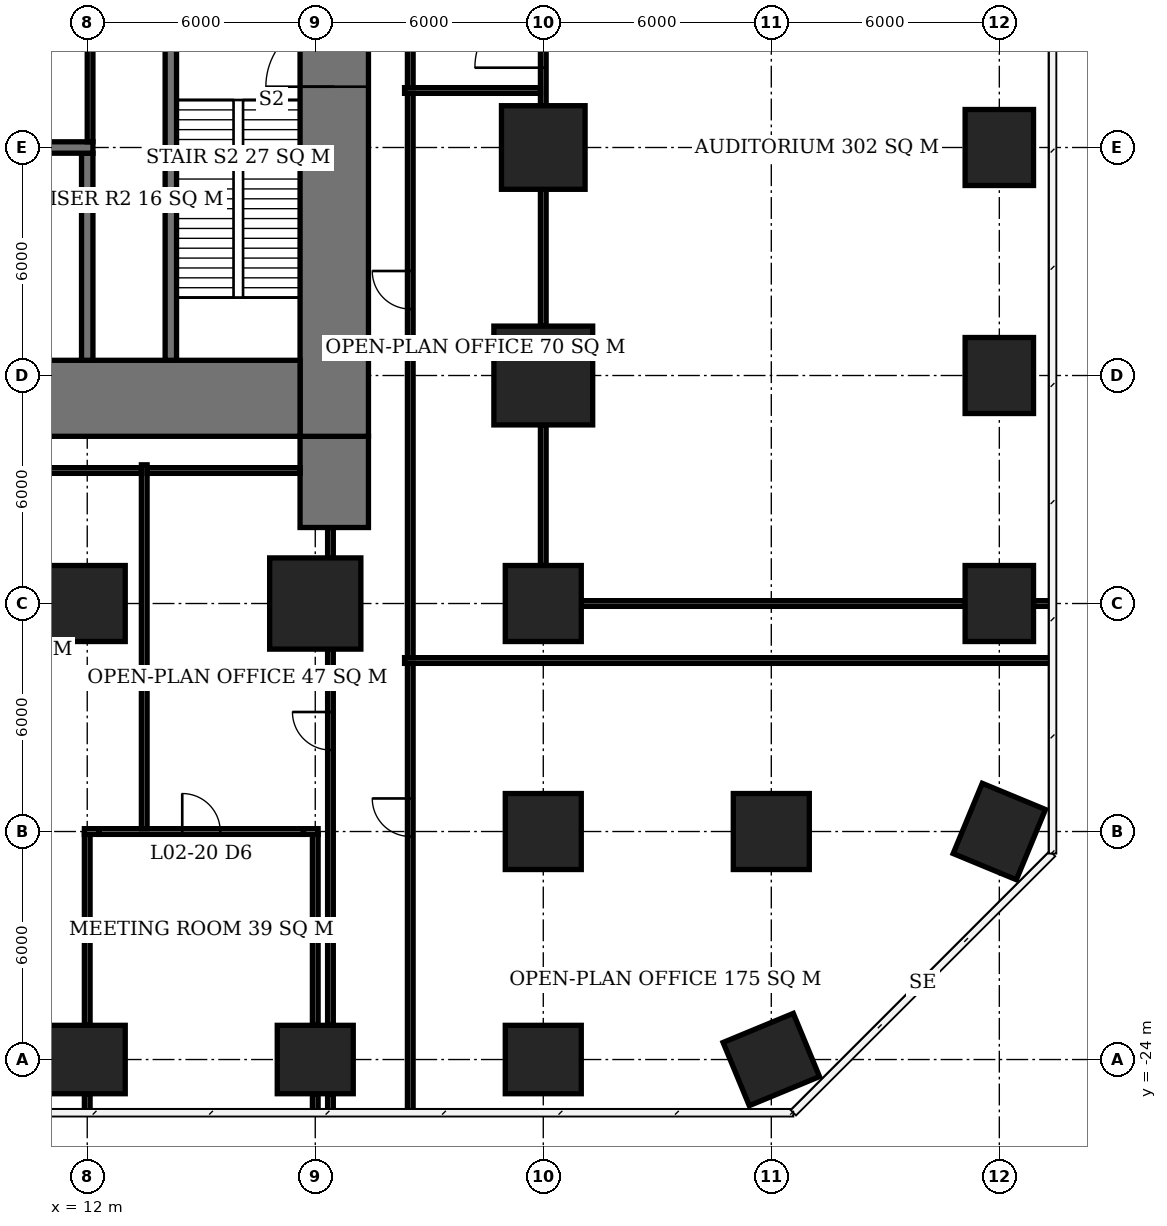
"""IFC4 building model, lengths in metres.
Left out: names, types, materials, properties, quantities, classifications, styles, units other than length and angle.
Written with IfcOpenShell. Run it as: python <this file> out.ifc"""

import sys

from ifc_helpers import new_model, si_unit, direction, frame, frame_2d, origin, origin_2d, place, context, subcontext, project, spatial, rectangle, extrude, element, fill, save


model = new_model("IFC4")
c1 = context("Model", 3, precision=1e-05, world=origin(), true_north=direction((0.0, 1.0)))
c2 = subcontext(c1, "Body", "Model", "MODEL_VIEW")
j1 = project(units=[si_unit("LENGTHUNIT", "METRE"), si_unit("PLANEANGLEUNIT", "RADIAN")], contexts=[c1])
p1 = place(None, origin())
s1 = spatial("IfcSite", under=j1, at=p1, CompositionType="ELEMENT")
p2 = place(p1, origin())
s2 = spatial("IfcBuilding", under=s1, at=p2, CompositionType="ELEMENT")
p3 = place(p2, frame((0.0, 0.0, 11.0)))
s3 = spatial("IfcBuildingStorey", under=s2, at=p3, CompositionType="ELEMENT", Elevation=11.0)
p4 = place(p3, frame((12.0, -24.0, 0.0), z_axis=(0.0, 0.0, 1.0), x_axis=(1.0, 0.0, 0.0)))
e1 = element("IfcColumn", 1, at=p4, inside=s3, PredefinedType="COLUMN", context=c2, shape_type="SweptSolid", body=[
    extrude(rectangle(XDim=2.0, YDim=1.8, at=origin_2d()), origin(), (0.0, 0.0, 1.0), 7.2),
])
p5 = place(p3, frame((12.0, -12.0, 0.0), z_axis=(0.0, 0.0, 1.0), x_axis=(1.0, 0.0, 0.0)))
e2 = element("IfcColumn", 2, at=p5, inside=s3, PredefinedType="COLUMN", context=c2, shape_type="SweptSolid", body=[
    extrude(rectangle(XDim=2.0, YDim=2.0, at=origin_2d()), origin(), (0.0, 0.0, 1.0), 7.2),
])
p6 = place(p3, frame((18.0, -24.0, 0.0), z_axis=(0.0, 0.0, 1.0), x_axis=(1.0, 0.0, 0.0)))
e3 = element("IfcColumn", 3, at=p6, inside=s3, PredefinedType="COLUMN", context=c2, shape_type="SweptSolid", body=[
    extrude(rectangle(XDim=2.0, YDim=1.8, at=origin_2d()), origin(), (0.0, 0.0, 1.0), 7.2),
])
p7 = place(p3, frame((18.0, -12.0, 0.0), z_axis=(0.0, 0.0, 1.0), x_axis=(1.0, 0.0, 0.0)))
e4 = element("IfcColumn", 4, at=p7, inside=s3, PredefinedType="COLUMN", context=c2, shape_type="SweptSolid", body=[
    extrude(rectangle(XDim=2.4, YDim=2.4, at=origin_2d()), origin(), (0.0, 0.0, 1.0), 7.2),
])
p8 = place(p3, frame((24.0, -24.0, 0.0), z_axis=(0.0, 0.0, 1.0), x_axis=(1.0, 0.0, 0.0)))
e5 = element("IfcColumn", 5, at=p8, inside=s3, PredefinedType="COLUMN", context=c2, shape_type="SweptSolid", body=[
    extrude(rectangle(XDim=2.0, YDim=1.8, at=origin_2d()), origin(), (0.0, 0.0, 1.0), 7.2),
])
for number, where, z_axis, x_axis in (
    (6, (24.0, -18.0, 0.0), (0.0, 0.0, 1.0), (1.0, 0.0, 0.0)),
    (7, (24.0, -12.0, 0.0), (0.0, 0.0, 1.0), (1.0, 0.0, 0.0)),
):
    element("IfcColumn", number, at=place(p3, frame(where, z_axis=z_axis, x_axis=x_axis)), inside=s3, PredefinedType="COLUMN", context=c2, shape_type="SweptSolid", body=[
        extrude(rectangle(XDim=2.0, YDim=2.0, at=origin_2d()), origin(), (0.0, 0.0, 1.0), 7.2),
    ])
p9 = place(p3, frame((24.0, -6.0, 0.0), z_axis=(0.0, 0.0, 1.0), x_axis=(1.0, 0.0, 0.0)))
e8 = element("IfcColumn", 8, at=p9, inside=s3, PredefinedType="COLUMN", context=c2, shape_type="SweptSolid", body=[
    extrude(rectangle(XDim=2.6, YDim=2.6, at=origin_2d()), origin(), (0.0, 0.0, 1.0), 7.2),
])
p10 = place(p3, frame((24.0, 0.0, 0.0), z_axis=(0.0, 0.0, 1.0), x_axis=(1.0, 0.0, 0.0)))
e9 = element("IfcColumn", 9, at=p10, inside=s3, PredefinedType="COLUMN", context=c2, shape_type="SweptSolid", body=[
    extrude(rectangle(XDim=2.2, YDim=2.2, at=origin_2d()), origin(), (0.0, 0.0, 1.0), 7.2),
])
p11 = place(p3, frame((30.0, -24.0, 0.0), z_axis=(0.0, 0.0, 1.0), x_axis=(-0.923879532511, -0.382683432365, 0.0)))
e10 = element("IfcColumn", 10, at=p11, inside=s3, PredefinedType="COLUMN", context=c2, shape_type="SweptSolid", body=[
    extrude(rectangle(XDim=2.0, YDim=1.8, at=origin_2d()), origin(), (0.0, 0.0, 1.0), 7.2),
])
p12 = place(p3, frame((30.0, -18.0, 0.0), z_axis=(0.0, 0.0, 1.0), x_axis=(1.0, 0.0, 0.0)))
e11 = element("IfcColumn", 11, at=p12, inside=s3, PredefinedType="COLUMN", context=c2, shape_type="SweptSolid", body=[
    extrude(rectangle(XDim=2.0, YDim=2.0, at=origin_2d()), origin(), (0.0, 0.0, 1.0), 7.2),
])
for number, where, z_axis, x_axis in (
    (12, (36.0, -18.0, 0.0), (0.0, 0.0, 1.0), (-0.383, -0.924, 0.0)),
    (13, (36.0, -12.0, 0.0), (0.0, 0.0, 1.0), (0.0, 1.0, 0.0)),
    (14, (36.0, -6.0, 0.0), (0.0, 0.0, 1.0), (0.0, 1.0, 0.0)),
    (15, (36.0, 0.0, 0.0), (0.0, 0.0, 1.0), (0.0, 1.0, 0.0)),
):
    element("IfcColumn", number, at=place(p3, frame(where, z_axis=z_axis, x_axis=x_axis)), inside=s3, PredefinedType="COLUMN", context=c2, shape_type="SweptSolid", body=[
        extrude(rectangle(XDim=2.0, YDim=1.8, at=origin_2d()), origin(), (0.0, 0.0, 1.0), 7.2),
    ])
p13 = place(p3, frame((-5.6, -6.6, 0.0), z_axis=(0.0, 0.0, 1.0), x_axis=(1.0, 0.0, 0.0)))
e16 = element("IfcWall", 16, at=p13, inside=s3, PredefinedType="SHEAR", context=c2, shape_type="SweptSolid", body=[
    extrude(rectangle(XDim=23.2, YDim=2.0, at=frame_2d((11.6, 0.0))), origin(), (0.0, 0.0, 1.0), 7.2),
])
p14 = place(p3, frame((18.5, -7.6, 0.0), z_axis=(0.0, 0.0, 1.0), x_axis=(0.0, 1.0, 0.0)))
e17 = element("IfcWall", 17, at=p14, inside=s3, PredefinedType="SHEAR", context=c2, shape_type="SweptSolid", body=[
    extrude(rectangle(XDim=21.2, YDim=1.8, at=frame_2d((10.6, 0.0))), origin(), (0.0, 0.0, 1.0), 7.2),
])
p15 = place(p14, frame((9.2, 0.0, 0.0)))
e18 = element("IfcOpeningElement", 18, at=p15, cuts=e17, PredefinedType="OPENING", context=c2, shape_type="SweptSolid", body=[
    extrude(rectangle(XDim=1.8, YDim=2.4, at=frame_2d((0.9, 1.2))), frame((0.0, 0.91, 0.0), z_axis=(0.0, -1.0, 0.0), x_axis=(1.0, 0.0, 0.0)), (0.0, 0.0, 1.0), 1.82),
])
p16 = place(p3, frame((18.5, -10.0, 0.0), z_axis=(0.0, 0.0, 1.0), x_axis=(0.0, 1.0, 0.0)))
e19 = element("IfcWall", 19, at=p16, inside=s3, PredefinedType="SHEAR", context=c2, shape_type="SweptSolid", body=[
    extrude(rectangle(XDim=2.4, YDim=1.8, at=frame_2d((1.2, 0.0))), origin(), (0.0, 0.0, 1.0), 7.2),
])
p17 = place(p3, frame((-5.6, 0.0, 0.0), z_axis=(0.0, 0.0, 1.0), x_axis=(1.0, 0.0, 0.0)))
e20 = element("IfcWall", 20, at=p17, inside=s3, PredefinedType="SHEAR", context=c2, shape_type="SweptSolid", body=[
    extrude(rectangle(XDim=17.75, YDim=0.3, at=frame_2d((8.875, 0.0))), origin(), (0.0, 0.0, 1.0), 7.2),
])
p18 = place(p17, frame((0.6, 0.0, 0.0)))
e21 = element("IfcOpeningElement", 21, at=p18, cuts=e20, PredefinedType="OPENING", context=c2, shape_type="SweptSolid", body=[
    extrude(rectangle(XDim=0.9, YDim=2.1, at=frame_2d((0.45, 1.05))), frame((0.0, 0.16, 0.0), z_axis=(0.0, -1.0, 0.0), x_axis=(1.0, 0.0, 0.0)), (0.0, 0.0, 1.0), 0.32),
])
p19 = place(p17, frame((3.7, 0.0, 0.0)))
e22 = element("IfcOpeningElement", 22, at=p19, cuts=e20, PredefinedType="OPENING", context=c2, shape_type="SweptSolid", body=[
    extrude(rectangle(XDim=1.0, YDim=2.1, at=frame_2d((0.5, 1.05))), frame((0.0, 0.16, 0.0), z_axis=(0.0, -1.0, 0.0), x_axis=(1.0, 0.0, 0.0)), (0.0, 0.0, 1.0), 0.32),
])
p20 = place(p3, frame((12.0, -5.6, 0.0), z_axis=(0.0, 0.0, 1.0), x_axis=(0.0, 1.0, 0.0)))
e23 = element("IfcWall", 23, at=p20, inside=s3, PredefinedType="SHEAR", context=c2, shape_type="SweptSolid", body=[
    extrude(rectangle(XDim=5.45, YDim=0.3, at=frame_2d((2.725, 0.0))), origin(), (0.0, 0.0, 1.0), 7.2),
])
p21 = place(p3, frame((14.2, -5.6, 0.0), z_axis=(0.0, 0.0, 1.0), x_axis=(0.0, 1.0, 0.0)))
e24 = element("IfcWall", 24, at=p21, inside=s3, PredefinedType="SHEAR", context=c2, shape_type="SweptSolid", body=[
    extrude(rectangle(XDim=8.45, YDim=0.3, at=frame_2d((4.225, 0.0))), origin(), (0.0, 0.0, 1.0), 7.2),
])
p22 = place(p3, frame((11.925, -18.0, 0.0), z_axis=(0.0, 0.0, 1.0), x_axis=(1.0, 0.0, 0.0)))
e25 = element("IfcWall", 25, at=p22, inside=s3, PredefinedType="PARTITIONING", context=c2, shape_type="SweptSolid", body=[
    extrude(rectangle(XDim=0.385, YDim=0.15, at=frame_2d((0.192, 0.0))), origin(), (0.0, 0.0, 1.0), 6.35),
])
p23 = place(p3, frame((12.31, -18.0, 0.0), z_axis=(0.0, 0.0, 1.0), x_axis=(1.0, 0.0, 0.0)))
e26 = element("IfcWall", 26, at=p23, inside=s3, PredefinedType="PARTITIONING", context=c2, shape_type="SweptSolid", body=[
    extrude(rectangle(XDim=5.38, YDim=0.15, at=frame_2d((2.69, 0.0))), origin(), (0.0, 0.0, 1.0), 6.95),
])
p24 = place(p23, frame((2.19, 0.0, 0.0)))
e27 = element("IfcOpeningElement", 27, at=p24, cuts=e26, PredefinedType="OPENING", context=c2, shape_type="SweptSolid", body=[
    extrude(rectangle(XDim=1.0, YDim=2.1, at=frame_2d((0.5, 1.05))), frame((0.0, 0.085, 0.0), z_axis=(0.0, -1.0, 0.0), x_axis=(1.0, 0.0, 0.0)), (0.0, 0.0, 1.0), 0.17),
])
p25 = place(p3, frame((17.69, -18.0, 0.0), z_axis=(0.0, 0.0, 1.0), x_axis=(1.0, 0.0, 0.0)))
e28 = element("IfcWall", 28, at=p25, inside=s3, PredefinedType="PARTITIONING", context=c2, shape_type="SweptSolid", body=[
    extrude(rectangle(XDim=0.385, YDim=0.15, at=frame_2d((0.192, 0.0))), origin(), (0.0, 0.0, 1.0), 6.35),
])
p26 = place(p3, frame((25.0, -12.0, 0.0), z_axis=(0.0, 0.0, 1.0), x_axis=(1.0, 0.0, 0.0)))
e29 = element("IfcWall", 29, at=p26, inside=s3, PredefinedType="PARTITIONING", context=c2, shape_type="SweptSolid", body=[
    extrude(rectangle(XDim=10.1, YDim=0.15, at=frame_2d((5.05, 0.0))), origin(), (0.0, 0.0, 1.0), 6.8),
])
p27 = place(p3, frame((36.9, -12.0, 0.0), z_axis=(0.0, 0.0, 1.0), x_axis=(1.0, 0.0, 0.0)))
e30 = element("IfcWall", 30, at=p27, inside=s3, PredefinedType="PARTITIONING", context=c2, shape_type="SweptSolid", body=[
    extrude(rectangle(XDim=0.475, YDim=0.15, at=frame_2d((0.238, 0.0))), origin(), (0.0, 0.0, 1.0), 6.8),
])
p28 = place(p3, frame((12.0, -25.375, 0.0), z_axis=(0.0, 0.0, 1.0), x_axis=(0.0, 1.0, 0.0)))
e31 = element("IfcWall", 31, at=p28, inside=s3, PredefinedType="PARTITIONING", context=c2, shape_type="SweptSolid", body=[
    extrude(rectangle(XDim=0.475, YDim=0.15, at=frame_2d((0.238, 0.0))), origin(), (0.0, 0.0, 1.0), 6.95),
])
p29 = place(p3, frame((12.0, -23.1, 0.0), z_axis=(0.0, 0.0, 1.0), x_axis=(0.0, 1.0, 0.0)))
e32 = element("IfcWall", 32, at=p29, inside=s3, PredefinedType="PARTITIONING", context=c2, shape_type="SweptSolid", body=[
    extrude(rectangle(XDim=5.025, YDim=0.15, at=frame_2d((2.513, 0.0))), origin(), (0.0, 0.0, 1.0), 6.35),
])
p30 = place(p3, frame((18.0, -25.375, 0.0), z_axis=(0.0, 0.0, 1.0), x_axis=(0.0, 1.0, 0.0)))
e33 = element("IfcWall", 33, at=p30, inside=s3, PredefinedType="PARTITIONING", context=c2, shape_type="SweptSolid", body=[
    extrude(rectangle(XDim=0.475, YDim=0.15, at=frame_2d((0.238, 0.0))), origin(), (0.0, 0.0, 1.0), 6.95),
])
p31 = place(p3, frame((18.0, -23.1, 0.0), z_axis=(0.0, 0.0, 1.0), x_axis=(0.0, 1.0, 0.0)))
e34 = element("IfcWall", 34, at=p31, inside=s3, PredefinedType="PARTITIONING", context=c2, shape_type="SweptSolid", body=[
    extrude(rectangle(XDim=5.025, YDim=0.15, at=frame_2d((2.513, 0.0))), origin(), (0.0, 0.0, 1.0), 6.35),
])
p32 = place(p3, frame((24.0, -11.0, 0.0), z_axis=(0.0, 0.0, 1.0), x_axis=(0.0, 1.0, 0.0)))
e35 = element("IfcWall", 35, at=p32, inside=s3, PredefinedType="PARTITIONING", context=c2, shape_type="SweptSolid", body=[
    extrude(rectangle(XDim=3.7, YDim=0.15, at=frame_2d((1.85, 0.0))), origin(), (0.0, 0.0, 1.0), 6.8),
])
p33 = place(p3, frame((24.0, -4.7, 0.0), z_axis=(0.0, 0.0, 1.0), x_axis=(0.0, 1.0, 0.0)))
e36 = element("IfcWall", 36, at=p33, inside=s3, PredefinedType="PARTITIONING", context=c2, shape_type="SweptSolid", body=[
    extrude(rectangle(XDim=3.6, YDim=0.15, at=frame_2d((1.8, 0.0))), origin(), (0.0, 0.0, 1.0), 6.8),
])
p34 = place(p3, frame((24.0, 1.1, 0.0), z_axis=(0.0, 0.0, 1.0), x_axis=(0.0, 1.0, 0.0)))
e37 = element("IfcWall", 37, at=p34, inside=s3, PredefinedType="PARTITIONING", context=c2, shape_type="SweptSolid", body=[
    extrude(rectangle(XDim=3.8, YDim=0.15, at=frame_2d((1.9, 0.0))), origin(), (0.0, 0.0, 1.0), 6.8),
])
p35 = place(p34, frame((1.0, 0.0, 0.0)))
e38 = element("IfcOpeningElement", 38, at=p35, cuts=e37, PredefinedType="OPENING", context=c2, shape_type="SweptSolid", body=[
    extrude(rectangle(XDim=1.8, YDim=2.4, at=frame_2d((0.9, 1.2))), frame((0.0, 0.085, 0.0), z_axis=(0.0, -1.0, 0.0), x_axis=(1.0, 0.0, 0.0)), (0.0, 0.0, 1.0), 0.17),
])
p36 = place(p3, frame((13.425, -8.5, 0.0), z_axis=(0.0, 0.0, 1.0), x_axis=(-1.0, 0.0, 0.0)))
e39 = element("IfcWall", 39, at=p36, inside=s3, PredefinedType="PARTITIONING", context=c2, shape_type="SweptSolid", body=[
    extrude(rectangle(XDim=11.925, YDim=0.15, at=frame_2d((5.962, 0.0))), origin(), (0.0, 0.0, 1.0), 6.95),
])
p37 = place(p36, frame((7.225, 0.0, 0.0)))
e40 = element("IfcOpeningElement", 40, at=p37, cuts=e39, PredefinedType="OPENING", context=c2, shape_type="SweptSolid", body=[
    extrude(rectangle(XDim=1.0, YDim=2.1, at=frame_2d((0.5, 1.05))), frame((0.0, 0.085, 0.0), z_axis=(0.0, -1.0, 0.0), x_axis=(1.0, 0.0, 0.0)), (0.0, 0.0, 1.0), 0.17),
])
p38 = place(p3, frame((13.5, -17.925, 0.0), z_axis=(0.0, 0.0, 1.0), x_axis=(0.0, 1.0, 0.0)))
e41 = element("IfcWall", 41, at=p38, inside=s3, PredefinedType="PARTITIONING", context=c2, shape_type="SweptSolid", body=[
    extrude(rectangle(XDim=9.575, YDim=0.15, at=frame_2d((4.788, 0.0))), origin(), (0.0, 0.0, 1.0), 6.95),
])
p39 = place(p3, frame((13.575, -8.5, 0.0), z_axis=(0.0, 0.0, 1.0), x_axis=(1.0, 0.0, 0.0)))
e42 = element("IfcWall", 42, at=p39, inside=s3, PredefinedType="PARTITIONING", context=c2, shape_type="SweptSolid", body=[
    extrude(rectangle(XDim=4.025, YDim=0.15, at=frame_2d((2.013, 0.0))), origin(), (0.0, 0.0, 1.0), 6.95),
])
p40 = place(p3, frame((18.4, -25.35, 0.0), z_axis=(0.0, 0.0, 1.0), x_axis=(0.0, 1.0, 0.0)))
e43 = element("IfcWall", 43, at=p40, inside=s3, PredefinedType="PARTITIONING", context=c2, shape_type="SweptSolid", body=[
    extrude(rectangle(XDim=0.45, YDim=0.15, at=frame_2d((0.225, 0.0))), origin(), (0.0, 0.0, 1.0), 6.95),
])
p41 = place(p3, frame((18.4, -23.1, 0.0), z_axis=(0.0, 0.0, 1.0), x_axis=(0.0, 1.0, 0.0)))
e44 = element("IfcWall", 44, at=p41, inside=s3, PredefinedType="PARTITIONING", context=c2, shape_type="SweptSolid", body=[
    extrude(rectangle(XDim=9.9, YDim=0.15, at=frame_2d((4.95, 0.0))), origin(), (0.0, 0.0, 1.0), 6.95),
])
p42 = place(p41, frame((7.245, 0.0, 0.0)))
e45 = element("IfcOpeningElement", 45, at=p42, cuts=e44, PredefinedType="OPENING", context=c2, shape_type="SweptSolid", body=[
    extrude(rectangle(XDim=1.0, YDim=2.1, at=frame_2d((0.5, 1.05))), frame((0.0, 0.085, 0.0), z_axis=(0.0, -1.0, 0.0), x_axis=(1.0, 0.0, 0.0)), (0.0, 0.0, 1.0), 0.17),
])
p43 = place(p3, frame((18.4, -10.8, 0.0), z_axis=(0.0, 0.0, 1.0), x_axis=(0.0, 1.0, 0.0)))
e46 = element("IfcWall", 46, at=p43, inside=s3, PredefinedType="PARTITIONING", context=c2, shape_type="SweptSolid", body=[
    extrude(rectangle(XDim=0.8, YDim=0.15, at=frame_2d((0.4, 0.0))), origin(), (0.0, 0.0, 1.0), 6.95),
])
p44 = place(p3, frame((20.5, -25.375, 0.0), z_axis=(0.0, 0.0, 1.0), x_axis=(0.0, 1.0, 0.0)))
e47 = element("IfcWall", 47, at=p44, inside=s3, PredefinedType="PARTITIONING", context=c2, shape_type="SweptSolid", body=[
    extrude(rectangle(XDim=11.8, YDim=0.15, at=frame_2d((5.9, 0.0))), origin(), (0.0, 0.0, 1.0), 6.95),
])
p45 = place(p44, frame((7.245, 0.0, 0.0)))
e48 = element("IfcOpeningElement", 48, at=p45, cuts=e47, PredefinedType="OPENING", context=c2, shape_type="SweptSolid", body=[
    extrude(rectangle(XDim=1.0, YDim=2.1, at=frame_2d((0.5, 1.05))), frame((0.0, 0.085, 0.0), z_axis=(0.0, -1.0, 0.0), x_axis=(1.0, 0.0, 0.0)), (0.0, 0.0, 1.0), 0.17),
])
p46 = place(p3, frame((20.5, -13.425, 0.0), z_axis=(0.0, 0.0, 1.0), x_axis=(0.0, 1.0, 0.0)))
e49 = element("IfcWall", 49, at=p46, inside=s3, PredefinedType="PARTITIONING", context=c2, shape_type="SweptSolid", body=[
    extrude(rectangle(XDim=14.85, YDim=0.15, at=frame_2d((7.425, 0.0))), origin(), (0.0, 0.0, 1.0), 6.95),
])
p47 = place(p46, frame((9.175, 0.0, 0.0)))
e50 = element("IfcOpeningElement", 50, at=p47, cuts=e49, PredefinedType="OPENING", context=c2, shape_type="SweptSolid", body=[
    extrude(rectangle(XDim=1.0, YDim=2.1, at=frame_2d((0.5, 1.05))), frame((0.0, 0.085, 0.0), z_axis=(0.0, -1.0, 0.0), x_axis=(1.0, 0.0, 0.0)), (0.0, 0.0, 1.0), 0.17),
])
p48 = place(p3, frame((20.35, -13.5, 0.0), z_axis=(0.0, 0.0, 1.0), x_axis=(1.0, 0.0, 0.0)))
e51 = element("IfcWall", 51, at=p48, inside=s3, PredefinedType="PARTITIONING", context=c2, shape_type="SweptSolid", body=[
    extrude(rectangle(XDim=17.025, YDim=0.15, at=frame_2d((8.512, 0.0))), origin(), (0.0, 0.0, 1.0), 6.95),
])
p49 = place(p3, frame((20.5, 1.575, 0.0), z_axis=(0.0, 0.0, 1.0), x_axis=(0.0, 1.0, 0.0)))
e52 = element("IfcWall", 52, at=p49, inside=s3, PredefinedType="PARTITIONING", context=c2, shape_type="SweptSolid", body=[
    extrude(rectangle(XDim=14.95, YDim=0.15, at=frame_2d((7.475, 0.0))), origin(), (0.0, 0.0, 1.0), 6.95),
])
p50 = place(p49, frame((7.875, 0.0, 0.0)))
e53 = element("IfcOpeningElement", 53, at=p50, cuts=e52, PredefinedType="OPENING", context=c2, shape_type="SweptSolid", body=[
    extrude(rectangle(XDim=1.0, YDim=2.1, at=frame_2d((0.5, 1.05))), frame((0.0, 0.085, 0.0), z_axis=(0.0, -1.0, 0.0), x_axis=(1.0, 0.0, 0.0)), (0.0, 0.0, 1.0), 0.17),
])
p51 = place(p3, frame((20.35, 1.5, 0.0), z_axis=(0.0, 0.0, 1.0), x_axis=(1.0, 0.0, 0.0)))
e54 = element("IfcWall", 54, at=p51, inside=s3, PredefinedType="PARTITIONING", context=c2, shape_type="SweptSolid", body=[
    extrude(rectangle(XDim=3.575, YDim=0.15, at=frame_2d((1.788, 0.0))), origin(), (0.0, 0.0, 1.0), 6.95),
])
p52 = place(p3, frame((12.075, 0.15, 0.0), z_axis=(0.0, 0.0, 1.0), x_axis=(0.0, 1.0, 0.0)))
e55 = element("IfcWall", 55, at=p52, inside=s3, PredefinedType="PARTITIONING", context=c2, shape_type="SweptSolid", body=[
    extrude(rectangle(XDim=3.0, YDim=0.15, at=frame_2d((1.5, 0.0))), origin(), (0.0, 0.0, 1.0), 6.95),
])
p53 = place(p15, origin())
e56 = element("IfcDoor", 56, at=p53, inside=s3, OperationType="DOUBLE_DOOR_SINGLE_SWING", PredefinedType="DOOR", context=c2, shape_type="SweptSolid", body=[
    extrude(rectangle(XDim=1.8, YDim=2.4, at=frame_2d((0.9, 1.2))), frame((0.0, 0.025, 0.0), z_axis=(0.0, -1.0, 0.0), x_axis=(1.0, 0.0, 0.0)), (0.0, 0.0, 1.0), 0.05),
])
fill(e18, e56)
p54 = place(p35, origin())
e57 = element("IfcDoor", 57, at=p54, inside=s3, OperationType="DOUBLE_DOOR_SINGLE_SWING", PredefinedType="DOOR", context=c2, shape_type="SweptSolid", body=[
    extrude(rectangle(XDim=1.8, YDim=2.4, at=frame_2d((0.9, 1.2))), frame((0.0, 0.025, 0.0), z_axis=(0.0, -1.0, 0.0), x_axis=(1.0, 0.0, 0.0)), (0.0, 0.0, 1.0), 0.05),
])
fill(e38, e57)
p55 = place(p24, origin())
e58 = element("IfcDoor", 58, at=p55, inside=s3, OperationType="SINGLE_SWING_LEFT", PredefinedType="DOOR", context=c2, shape_type="SweptSolid", body=[
    extrude(rectangle(XDim=1.0, YDim=2.1, at=frame_2d((0.5, 1.05))), frame((0.0, 0.025, 0.0), z_axis=(0.0, -1.0, 0.0), x_axis=(1.0, 0.0, 0.0)), (0.0, 0.0, 1.0), 0.05),
])
fill(e27, e58)
p56 = place(p45, origin())
e59 = element("IfcDoor", 59, at=p56, inside=s3, OperationType="SINGLE_SWING_RIGHT", PredefinedType="DOOR", context=c2, shape_type="SweptSolid", body=[
    extrude(rectangle(XDim=1.0, YDim=2.1, at=frame_2d((0.5, 1.05))), frame((0.0, 0.025, 0.0), z_axis=(0.0, -1.0, 0.0), x_axis=(1.0, 0.0, 0.0)), (0.0, 0.0, 1.0), 0.05),
])
fill(e48, e59)
p57 = place(p42, origin())
e60 = element("IfcDoor", 60, at=p57, inside=s3, OperationType="SINGLE_SWING_RIGHT", PredefinedType="DOOR", context=c2, shape_type="SweptSolid", body=[
    extrude(rectangle(XDim=1.0, YDim=2.1, at=frame_2d((0.5, 1.05))), frame((0.0, 0.025, 0.0), z_axis=(0.0, -1.0, 0.0), x_axis=(1.0, 0.0, 0.0)), (0.0, 0.0, 1.0), 0.05),
])
fill(e45, e60)
p58 = place(p47, origin())
e61 = element("IfcDoor", 61, at=p58, inside=s3, OperationType="SINGLE_SWING_RIGHT", PredefinedType="DOOR", context=c2, shape_type="SweptSolid", body=[
    extrude(rectangle(XDim=1.0, YDim=2.1, at=frame_2d((0.5, 1.05))), frame((0.0, 0.025, 0.0), z_axis=(0.0, -1.0, 0.0), x_axis=(1.0, 0.0, 0.0)), (0.0, 0.0, 1.0), 0.05),
])
fill(e50, e61)
save(model, sys.argv[1])
